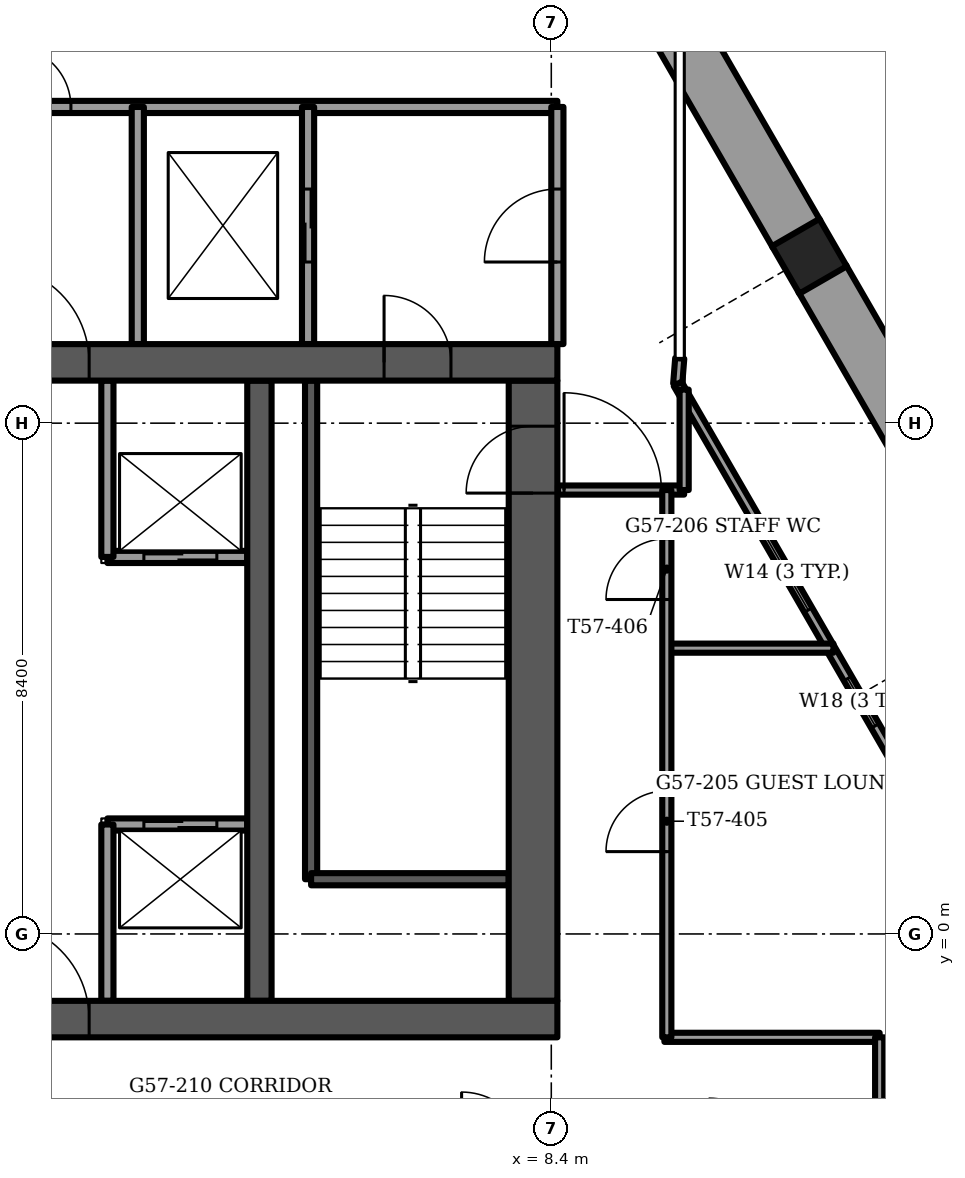
"""IFC4 building model, lengths in metres.
Left out: names, types, materials, properties, quantities, classifications, styles, units other than length and angle.
Written with IfcOpenShell. Run it as: python <this file> out.ifc"""

import sys

from ifc_helpers import new_model, si_unit, direction, frame, frame_2d, origin, origin_2d, place, context, subcontext, project, spatial, rectangle, extrude, element, fill, save


model = new_model("IFC4")
c1 = context("Model", 3, precision=1e-05, world=origin(), true_north=direction((0.0, 1.0)))
c2 = subcontext(c1, "Body", "Model", "MODEL_VIEW")
j1 = project(units=[si_unit("LENGTHUNIT", "METRE"), si_unit("PLANEANGLEUNIT", "RADIAN")], contexts=[c1])
p1 = place(None, origin())
s1 = spatial("IfcSite", under=j1, at=p1, CompositionType="ELEMENT")
p2 = place(p1, origin())
s2 = spatial("IfcBuilding", under=s1, at=p2, CompositionType="ELEMENT")
p3 = place(p2, frame((0.0, 0.0, 229.5)))
s3 = spatial("IfcBuildingStorey", under=s2, at=p3, CompositionType="ELEMENT", Elevation=229.5)
p4 = place(p3, frame((12.644, 11.145, -1.2), z_axis=(0.0, 0.0, 1.0), x_axis=(0.5, -0.866025403784, 0.0)))
e1 = element("IfcColumn", 1, at=p4, inside=s3, PredefinedType="COLUMN", context=c2, shape_type="SweptSolid", body=[
    extrude(rectangle(XDim=0.9, YDim=0.9, at=origin_2d()), origin(), (0.0, 0.0, 1.0), 3.75),
])
p5 = place(p3, frame((-8.5, -1.4, -0.3), z_axis=(0.0, 0.0, 1.0), x_axis=(1.0, 0.0, 0.0)))
e2 = element("IfcWall", 2, at=p5, inside=s3, PredefinedType="SHEAR", context=c2, shape_type="SweptSolid", body=[
    extrude(rectangle(XDim=17.0, YDim=0.6, at=frame_2d((8.5, 0.0))), origin(), (0.0, 0.0, 1.0), 3.75),
])
p6 = place(p5, frame((7.7, 0.0, 0.0)))
e3 = element("IfcOpeningElement", 3, at=p6, cuts=e2, PredefinedType="OPENING", context=c2, shape_type="SweptSolid", body=[
    extrude(rectangle(XDim=1.6, YDim=2.1, at=frame_2d((0.8, 1.05))), frame((0.0, 0.3, 0.0), z_axis=(0.0, -1.0, 0.0), x_axis=(1.0, 0.0, 0.0)), (0.0, 0.0, 1.0), 0.6),
])
p7 = place(p3, frame((-8.5, 9.4, -0.3), z_axis=(0.0, 0.0, 1.0), x_axis=(1.0, 0.0, 0.0)))
e4 = element("IfcWall", 4, at=p7, inside=s3, PredefinedType="SHEAR", context=c2, shape_type="SweptSolid", body=[
    extrude(rectangle(XDim=17.0, YDim=0.6, at=frame_2d((8.5, 0.0))), origin(), (0.0, 0.0, 1.0), 3.75),
])
p8 = place(p7, frame((7.7, 0.0, 0.0)))
e5 = element("IfcOpeningElement", 5, at=p8, cuts=e4, PredefinedType="OPENING", context=c2, shape_type="SweptSolid", body=[
    extrude(rectangle(XDim=1.6, YDim=2.1, at=frame_2d((0.8, 1.05))), frame((0.0, 0.3, 0.0), z_axis=(0.0, -1.0, 0.0), x_axis=(1.0, 0.0, 0.0)), (0.0, 0.0, 1.0), 0.6),
])
p9 = place(p7, frame((1.75, 0.0, 0.0)))
e6 = element("IfcOpeningElement", 6, at=p9, cuts=e4, PredefinedType="OPENING", context=c2, shape_type="SweptSolid", body=[
    extrude(rectangle(XDim=1.1, YDim=2.1, at=frame_2d((0.55, 1.05))), frame((0.0, 0.3, 0.0), z_axis=(0.0, -1.0, 0.0), x_axis=(1.0, 0.0, 0.0)), (0.0, 0.0, 1.0), 0.6),
])
p10 = place(p7, frame((14.15, 0.0, 0.0)))
e7 = element("IfcOpeningElement", 7, at=p10, cuts=e4, PredefinedType="OPENING", context=c2, shape_type="SweptSolid", body=[
    extrude(rectangle(XDim=1.1, YDim=2.1, at=frame_2d((0.55, 1.05))), frame((0.0, 0.3, 0.0), z_axis=(0.0, -1.0, 0.0), x_axis=(1.0, 0.0, 0.0)), (0.0, 0.0, 1.0), 0.6),
])
p11 = place(p3, frame((8.1, -1.1, -0.3), z_axis=(0.0, 0.0, 1.0), x_axis=(0.0, 1.0, 0.0)))
e8 = element("IfcWall", 8, at=p11, inside=s3, PredefinedType="SHEAR", context=c2, shape_type="SweptSolid", body=[
    extrude(rectangle(XDim=10.2, YDim=0.8, at=frame_2d((5.1, 0.0))), origin(), (0.0, 0.0, 1.0), 3.75),
])
p12 = place(p11, frame((8.35, 0.0, 0.0)))
e9 = element("IfcOpeningElement", 9, at=p12, cuts=e8, PredefinedType="OPENING", context=c2, shape_type="SweptSolid", body=[
    extrude(rectangle(XDim=1.1, YDim=2.1, at=frame_2d((0.55, 1.05))), frame((0.0, 0.4, 0.0), z_axis=(0.0, -1.0, 0.0), x_axis=(1.0, 0.0, 0.0)), (0.0, 0.0, 1.0), 0.8),
])
p13 = place(p3, frame((3.6, -1.1, -0.3), z_axis=(0.0, 0.0, 1.0), x_axis=(0.0, 1.0, 0.0)))
e10 = element("IfcWall", 10, at=p13, inside=s3, PredefinedType="SHEAR", context=c2, shape_type="SweptSolid", body=[
    extrude(rectangle(XDim=10.2, YDim=0.4, at=frame_2d((5.1, 0.0))), origin(), (0.0, 0.0, 1.0), 3.75),
])
p14 = place(p3, frame((15.764, 5.742, 0.0), z_axis=(0.0, 0.0, 1.0), x_axis=(-0.499997265274, 0.866026982673, 0.0)))
e11 = element("IfcWall", 11, at=p14, inside=s3, PredefinedType="PARAPET", context=c2, shape_type="SweptSolid", body=[
    extrude(rectangle(XDim=5.819, YDim=0.9, at=frame_2d((2.909, 0.0))), origin(), (0.0, 0.0, 1.0), 1.1),
])
p15 = place(p3, frame((12.434, 11.508, 0.0), z_axis=(0.0, 0.0, 1.0), x_axis=(-0.499994028088, 0.866028851642, 0.0)))
e12 = element("IfcWall", 12, at=p15, inside=s3, PredefinedType="PARAPET", context=c2, shape_type="SweptSolid", body=[
    extrude(rectangle(XDim=5.681, YDim=0.9, at=frame_2d((2.84, 0.0))), origin(), (0.0, 0.0, 1.0), 1.1),
])
p16 = place(p3, frame((10.479, -9.7, 0.0), z_axis=(0.0, 0.0, 1.0), x_axis=(0.499995050918, 0.866028261119, 0.0)))
e13 = element("IfcWall", 13, at=p16, inside=s3, PredefinedType="SOLIDWALL", context=c2, shape_type="SweptSolid", body=[
    extrude(rectangle(XDim=10.208, YDim=0.15, at=frame_2d((5.104, 0.0))), origin(), (0.0, 0.0, 1.0), 3.45),
])
p17 = place(p16, frame((3.461, 0.0, 0.15)))
e14 = element("IfcOpeningElement", 14, at=p17, cuts=e13, PredefinedType="OPENING", context=c2, shape_type="SweptSolid", body=[
    extrude(rectangle(XDim=0.9, YDim=2.2, at=frame_2d((0.45, 1.1))), frame((0.0, 0.075, 0.0), z_axis=(0.0, -1.0, 0.0), x_axis=(1.0, 0.0, 0.0)), (0.0, 0.0, 1.0), 0.15),
])
p18 = place(p16, frame((4.814, 0.0, 0.15)))
e15 = element("IfcOpeningElement", 15, at=p18, cuts=e13, PredefinedType="OPENING", context=c2, shape_type="SweptSolid", body=[
    extrude(rectangle(XDim=1.4, YDim=2.2, at=frame_2d((0.7, 1.1))), frame((0.0, 0.075, 0.0), z_axis=(0.0, -1.0, 0.0), x_axis=(1.0, 0.0, 0.0)), (0.0, 0.0, 1.0), 0.15),
])
p19 = place(p3, frame((15.583, 0.205, 0.0), z_axis=(0.0, 0.0, 1.0), x_axis=(-0.49998469459, 0.866034240187, 0.0)))
e16 = element("IfcWall", 16, at=p19, inside=s3, PredefinedType="SOLIDWALL", context=c2, shape_type="SweptSolid", body=[
    extrude(rectangle(XDim=10.208, YDim=0.15, at=frame_2d((5.104, 0.0))), origin(), (0.0, 0.0, 1.0), 3.45),
])
p20 = place(p19, frame((3.714, 0.0, 0.15)))
e17 = element("IfcOpeningElement", 17, at=p20, cuts=e16, PredefinedType="OPENING", context=c2, shape_type="SweptSolid", body=[
    extrude(rectangle(XDim=0.9, YDim=2.2, at=frame_2d((0.45, 1.1))), frame((0.0, 0.075, 0.0), z_axis=(0.0, -1.0, 0.0), x_axis=(1.0, 0.0, 0.0)), (0.0, 0.0, 1.0), 0.15),
])
p21 = place(p19, frame((5.914, 0.0, 0.15)))
e18 = element("IfcOpeningElement", 18, at=p21, cuts=e16, PredefinedType="OPENING", context=c2, shape_type="SweptSolid", body=[
    extrude(rectangle(XDim=1.4, YDim=2.2, at=frame_2d((0.7, 1.1))), frame((0.0, 0.075, 0.0), z_axis=(0.0, -1.0, 0.0), x_axis=(1.0, 0.0, 0.0)), (0.0, 0.0, 1.0), 0.15),
])
p22 = place(p3, frame((10.479, 9.045, 0.0), z_axis=(0.0, 0.0, 1.0), x_axis=(0.078869316502, 0.996884963732, 0.0)))
e19 = element("IfcWall", 19, at=p22, inside=s3, PredefinedType="SOLIDWALL", context=c2, shape_type="SweptSolid", body=[
    extrude(rectangle(XDim=0.421, YDim=0.15, at=frame_2d((0.21, 0.0))), origin(), (0.0, 0.0, 1.0), 3.45),
])
p23 = place(p3, frame((1.1, 1.8, 0.0), z_axis=(0.0, 0.0, 1.0), x_axis=(1.0, 0.0, 0.0)))
e20 = element("IfcWall", 20, at=p23, inside=s3, PredefinedType="PARTITIONING", context=c2, shape_type="SweptSolid", body=[
    extrude(rectangle(XDim=2.3, YDim=0.2, at=frame_2d((1.15, 0.0))), origin(), (0.0, 0.0, 1.0), 3.45),
])
p24 = place(p23, frame((0.6, 0.0, 0.0)))
e21 = element("IfcOpeningElement", 21, at=p24, cuts=e20, PredefinedType="OPENING", context=c2, shape_type="SweptSolid", body=[
    extrude(rectangle(XDim=1.2, YDim=2.1, at=frame_2d((0.6, 1.05))), frame((0.0, 0.1, 0.0), z_axis=(0.0, -1.0, 0.0), x_axis=(1.0, 0.0, 0.0)), (0.0, 0.0, 1.0), 0.2),
])
p25 = place(p3, frame((1.1, 6.2, 0.0), z_axis=(0.0, 0.0, 1.0), x_axis=(1.0, 0.0, 0.0)))
e22 = element("IfcWall", 22, at=p25, inside=s3, PredefinedType="PARTITIONING", context=c2, shape_type="SweptSolid", body=[
    extrude(rectangle(XDim=2.3, YDim=0.2, at=frame_2d((1.15, 0.0))), origin(), (0.0, 0.0, 1.0), 3.45),
])
p26 = place(p25, frame((0.6, 0.0, 0.0)))
e23 = element("IfcOpeningElement", 23, at=p26, cuts=e22, PredefinedType="OPENING", context=c2, shape_type="SweptSolid", body=[
    extrude(rectangle(XDim=1.2, YDim=2.1, at=frame_2d((0.6, 1.05))), frame((0.0, 0.1, 0.0), z_axis=(0.0, -1.0, 0.0), x_axis=(1.0, 0.0, 0.0)), (0.0, 0.0, 1.0), 0.2),
])
for number, where, z_axis, x_axis in (
    (24, (1.1, -1.1, 0.0), (0.0, 0.0, 1.0), (0.0, 1.0, 0.0)),
    (25, (1.1, 6.2, 0.0), (0.0, 0.0, 1.0), (0.0, 1.0, 0.0)),
):
    element("IfcWall", number, at=place(p3, frame(where, z_axis=z_axis, x_axis=x_axis)), inside=s3, PredefinedType="PARTITIONING", context=c2, shape_type="SweptSolid", body=[
        extrude(rectangle(XDim=2.9, YDim=0.2, at=frame_2d((1.45, 0.0))), origin(), (0.0, 0.0, 1.0), 3.45),
    ])
p27 = place(p3, frame((4.45, 0.9, -0.3), z_axis=(0.0, 0.0, 1.0), x_axis=(0.0, 1.0, 0.0)))
e26 = element("IfcWall", 26, at=p27, inside=s3, PredefinedType="SOLIDWALL", context=c2, shape_type="SweptSolid", body=[
    extrude(rectangle(XDim=8.2, YDim=0.2, at=frame_2d((4.1, 0.0))), origin(), (0.0, 0.0, 1.0), 3.75),
])
p28 = place(p3, frame((4.45, 0.9, -0.3), z_axis=(0.0, 0.0, 1.0), x_axis=(1.0, 0.0, 0.0)))
e27 = element("IfcWall", 27, at=p28, inside=s3, PredefinedType="SOLIDWALL", context=c2, shape_type="SweptSolid", body=[
    extrude(rectangle(XDim=3.25, YDim=0.2, at=frame_2d((1.625, 0.0))), origin(), (0.0, 0.0, 1.0), 3.75),
])
p29 = place(p3, frame((-8.5, 13.6, 0.0), z_axis=(0.0, 0.0, 1.0), x_axis=(1.0, 0.0, 0.0)))
e28 = element("IfcWall", 28, at=p29, inside=s3, PredefinedType="PARTITIONING", context=c2, shape_type="SweptSolid", body=[
    extrude(rectangle(XDim=17.0, YDim=0.2, at=frame_2d((8.5, 0.0))), origin(), (0.0, 0.0, 1.0), 3.45),
])
p30 = place(p29, frame((8.0, 0.0, 0.0)))
e29 = element("IfcOpeningElement", 29, at=p30, cuts=e28, PredefinedType="OPENING", context=c2, shape_type="SweptSolid", body=[
    extrude(rectangle(XDim=1.0, YDim=2.1, at=frame_2d((0.5, 1.05))), frame((0.0, 0.1, 0.0), z_axis=(0.0, -1.0, 0.0), x_axis=(1.0, 0.0, 0.0)), (0.0, 0.0, 1.0), 0.2),
])
p31 = place(p3, frame((8.5, 9.7, 0.0), z_axis=(0.0, 0.0, 1.0), x_axis=(0.0, 1.0, 0.0)))
e30 = element("IfcWall", 30, at=p31, inside=s3, PredefinedType="PARTITIONING", context=c2, shape_type="SweptSolid", body=[
    extrude(rectangle(XDim=3.9, YDim=0.2, at=frame_2d((1.95, 0.0))), origin(), (0.0, 0.0, 1.0), 3.45),
])
p32 = place(p31, frame((1.35, 0.0, 0.0)))
e31 = element("IfcOpeningElement", 31, at=p32, cuts=e30, PredefinedType="OPENING", context=c2, shape_type="SweptSolid", body=[
    extrude(rectangle(XDim=1.2, YDim=2.1, at=frame_2d((0.6, 1.05))), frame((0.0, 0.1, 0.0), z_axis=(0.0, -1.0, 0.0), x_axis=(1.0, 0.0, 0.0)), (0.0, 0.0, 1.0), 0.2),
])
p33 = place(p3, frame((4.4, 9.7, 0.0), z_axis=(0.0, 0.0, 1.0), x_axis=(0.0, 1.0, 0.0)))
e32 = element("IfcWall", 32, at=p33, inside=s3, PredefinedType="PARTITIONING", context=c2, shape_type="SweptSolid", body=[
    extrude(rectangle(XDim=3.9, YDim=0.2, at=frame_2d((1.95, 0.0))), origin(), (0.0, 0.0, 1.0), 3.45),
])
p34 = place(p33, frame((1.35, 0.0, 0.0)))
e33 = element("IfcOpeningElement", 33, at=p34, cuts=e32, PredefinedType="OPENING", context=c2, shape_type="SweptSolid", body=[
    extrude(rectangle(XDim=1.2, YDim=2.1, at=frame_2d((0.6, 1.05))), frame((0.0, 0.1, 0.0), z_axis=(0.0, -1.0, 0.0), x_axis=(1.0, 0.0, 0.0)), (0.0, 0.0, 1.0), 0.2),
])
p35 = place(p3, frame((1.6, 9.7, 0.0), z_axis=(0.0, 0.0, 1.0), x_axis=(0.0, 1.0, 0.0)))
e34 = element("IfcWall", 34, at=p35, inside=s3, PredefinedType="PARTITIONING", context=c2, shape_type="SweptSolid", body=[
    extrude(rectangle(XDim=3.9, YDim=0.2, at=frame_2d((1.95, 0.0))), origin(), (0.0, 0.0, 1.0), 3.45),
])
p36 = place(p3, frame((10.26, -1.7, 0.0), z_axis=(0.0, 0.0, 1.0), x_axis=(1.0, 0.0, 0.0)))
e35 = element("IfcWall", 35, at=p36, inside=s3, PredefinedType="PARTITIONING", context=c2, shape_type="SweptSolid", body=[
    extrude(rectangle(XDim=3.54, YDim=0.15, at=frame_2d((1.77, 0.0))), origin(), (0.0, 0.0, 1.0), 3.45),
])
p37 = place(p3, frame((10.3, 4.7, 0.0), z_axis=(0.0, 0.0, 1.0), x_axis=(1.0, 0.0, 0.0)))
e36 = element("IfcWall", 36, at=p37, inside=s3, PredefinedType="PARTITIONING", context=c2, shape_type="SweptSolid", body=[
    extrude(rectangle(XDim=2.74, YDim=0.15, at=frame_2d((1.37, 0.0))), origin(), (0.0, 0.0, 1.0), 3.45),
])
p38 = place(p3, frame((8.51, 7.3, 0.0), z_axis=(0.0, 0.0, 1.0), x_axis=(1.0, 0.0, 0.0)))
e37 = element("IfcWall", 37, at=p38, inside=s3, PredefinedType="PARTITIONING", context=c2, shape_type="SweptSolid", body=[
    extrude(rectangle(XDim=2.075, YDim=0.15, at=frame_2d((1.038, 0.0))), origin(), (0.0, 0.0, 1.0), 3.45),
])
p39 = place(p38, frame((0.1, 0.0, 0.0)))
e38 = element("IfcOpeningElement", 38, at=p39, cuts=e37, PredefinedType="OPENING", context=c2, shape_type="SweptSolid", body=[
    extrude(rectangle(XDim=1.6, YDim=2.1, at=frame_2d((0.8, 1.05))), frame((0.0, 0.075, 0.0), z_axis=(0.0, -1.0, 0.0), x_axis=(1.0, 0.0, 0.0)), (0.0, 0.0, 1.0), 0.15),
])
p40 = place(p3, frame((13.8, -4.038, 0.0), z_axis=(0.0, 0.0, 1.0), x_axis=(0.0, 1.0, 0.0)))
e39 = element("IfcWall", 39, at=p40, inside=s3, PredefinedType="PARTITIONING", context=c2, shape_type="SweptSolid", body=[
    extrude(rectangle(XDim=2.338, YDim=0.15, at=frame_2d((1.169, 0.0))), origin(), (0.0, 0.0, 1.0), 3.45),
])
p41 = place(p3, frame((10.585, 7.3, 0.0), z_axis=(0.0, 0.0, 1.0), x_axis=(0.0, 1.0, 0.0)))
e40 = element("IfcWall", 40, at=p41, inside=s3, PredefinedType="PARTITIONING", context=c2, shape_type="SweptSolid", body=[
    extrude(rectangle(XDim=1.652, YDim=0.15, at=frame_2d((0.826, 0.0))), origin(), (0.0, 0.0, 1.0), 3.45),
])
p42 = place(p3, frame((10.3, -1.7, 0.0), z_axis=(0.0, 0.0, 1.0), x_axis=(0.0, 1.0, 0.0)))
e41 = element("IfcWall", 41, at=p42, inside=s3, PredefinedType="PARTITIONING", context=c2, shape_type="SweptSolid", body=[
    extrude(rectangle(XDim=9.0, YDim=0.15, at=frame_2d((4.5, 0.0))), origin(), (0.0, 0.0, 1.0), 3.45),
])
p43 = place(p42, frame((3.054, 0.0, 0.0)))
e42 = element("IfcOpeningElement", 42, at=p43, cuts=e41, PredefinedType="OPENING", context=c2, shape_type="SweptSolid", body=[
    extrude(rectangle(XDim=1.0, YDim=2.1, at=frame_2d((0.5, 1.05))), frame((0.0, 0.075, 0.0), z_axis=(0.0, -1.0, 0.0), x_axis=(1.0, 0.0, 0.0)), (0.0, 0.0, 1.0), 0.15),
])
p44 = place(p42, frame((7.2, 0.0, 0.0)))
e43 = element("IfcOpeningElement", 43, at=p44, cuts=e41, PredefinedType="OPENING", context=c2, shape_type="SweptSolid", body=[
    extrude(rectangle(XDim=1.0, YDim=2.1, at=frame_2d((0.5, 1.05))), frame((0.0, 0.075, 0.0), z_axis=(0.0, -1.0, 0.0), x_axis=(1.0, 0.0, 0.0)), (0.0, 0.0, 1.0), 0.15),
])
p45 = place(p20, origin())
e44 = element("IfcWindow", 44, at=p45, inside=s3, PartitioningType="SINGLE_PANEL", PredefinedType="WINDOW", context=c2, shape_type="SweptSolid", body=[
    extrude(rectangle(XDim=0.9, YDim=2.2, at=frame_2d((0.45, 1.1))), frame((0.0, 0.03, 0.0), z_axis=(0.0, -1.0, 0.0), x_axis=(1.0, 0.0, 0.0)), (0.0, 0.0, 1.0), 0.06),
])
fill(e17, e44)
p46 = place(p21, origin())
e45 = element("IfcWindow", 45, at=p46, inside=s3, PartitioningType="SINGLE_PANEL", PredefinedType="WINDOW", context=c2, shape_type="SweptSolid", body=[
    extrude(rectangle(XDim=1.4, YDim=2.2, at=frame_2d((0.7, 1.1))), frame((0.0, 0.03, 0.0), z_axis=(0.0, -1.0, 0.0), x_axis=(1.0, 0.0, 0.0)), (0.0, 0.0, 1.0), 0.06),
])
fill(e18, e45)
p47 = place(p24, origin())
e46 = element("IfcDoor", 46, at=p47, inside=s3, OperationType="SLIDING_TO_LEFT", PredefinedType="DOOR", context=c2, shape_type="SweptSolid", body=[
    extrude(rectangle(XDim=1.2, YDim=2.1, at=frame_2d((0.6, 1.05))), frame((0.0, 0.025, 0.0), z_axis=(0.0, -1.0, 0.0), x_axis=(1.0, 0.0, 0.0)), (0.0, 0.0, 1.0), 0.05),
])
fill(e21, e46)
p48 = place(p26, origin())
e47 = element("IfcDoor", 47, at=p48, inside=s3, OperationType="SLIDING_TO_LEFT", PredefinedType="DOOR", context=c2, shape_type="SweptSolid", body=[
    extrude(rectangle(XDim=1.2, YDim=2.1, at=frame_2d((0.6, 1.05))), frame((0.0, 0.025, 0.0), z_axis=(0.0, -1.0, 0.0), x_axis=(1.0, 0.0, 0.0)), (0.0, 0.0, 1.0), 0.05),
])
fill(e23, e47)
p49 = place(p6, origin())
e48 = element("IfcDoor", 48, at=p49, inside=s3, OperationType="DOUBLE_DOOR_SINGLE_SWING", PredefinedType="DOOR", context=c2, shape_type="SweptSolid", body=[
    extrude(rectangle(XDim=1.6, YDim=2.1, at=frame_2d((0.8, 1.05))), frame((0.0, 0.025, 0.0), z_axis=(0.0, -1.0, 0.0), x_axis=(1.0, 0.0, 0.0)), (0.0, 0.0, 1.0), 0.05),
])
fill(e3, e48)
p50 = place(p8, origin())
e49 = element("IfcDoor", 49, at=p50, inside=s3, OperationType="DOUBLE_DOOR_SINGLE_SWING", PredefinedType="DOOR", context=c2, shape_type="SweptSolid", body=[
    extrude(rectangle(XDim=1.6, YDim=2.1, at=frame_2d((0.8, 1.05))), frame((0.0, 0.025, 0.0), z_axis=(0.0, -1.0, 0.0), x_axis=(1.0, 0.0, 0.0)), (0.0, 0.0, 1.0), 0.05),
])
fill(e5, e49)
p51 = place(p10, origin())
e50 = element("IfcDoor", 50, at=p51, inside=s3, OperationType="SINGLE_SWING_RIGHT", PredefinedType="DOOR", context=c2, shape_type="SweptSolid", body=[
    extrude(rectangle(XDim=1.1, YDim=2.1, at=frame_2d((0.55, 1.05))), frame((0.0, 0.025, 0.0), z_axis=(0.0, -1.0, 0.0), x_axis=(1.0, 0.0, 0.0)), (0.0, 0.0, 1.0), 0.05),
])
fill(e7, e50)
p52 = place(p12, origin())
e51 = element("IfcDoor", 51, at=p52, inside=s3, OperationType="SINGLE_SWING_LEFT", PredefinedType="DOOR", context=c2, shape_type="SweptSolid", body=[
    extrude(rectangle(XDim=1.1, YDim=2.1, at=frame_2d((0.55, 1.05))), frame((0.0, 0.025, 0.0), z_axis=(0.0, -1.0, 0.0), x_axis=(1.0, 0.0, 0.0)), (0.0, 0.0, 1.0), 0.05),
])
fill(e9, e51)
p53 = place(p34, origin())
e52 = element("IfcDoor", 52, at=p53, inside=s3, OperationType="SLIDING_TO_LEFT", PredefinedType="DOOR", context=c2, shape_type="SweptSolid", body=[
    extrude(rectangle(XDim=1.2, YDim=2.1, at=frame_2d((0.6, 1.05))), frame((0.0, 0.025, 0.0), z_axis=(0.0, -1.0, 0.0), x_axis=(1.0, 0.0, 0.0)), (0.0, 0.0, 1.0), 0.05),
])
fill(e33, e52)
p54 = place(p32, origin())
e53 = element("IfcDoor", 53, at=p54, inside=s3, OperationType="SINGLE_SWING_LEFT", PredefinedType="DOOR", context=c2, shape_type="SweptSolid", body=[
    extrude(rectangle(XDim=1.2, YDim=2.1, at=frame_2d((0.6, 1.05))), frame((0.0, 0.025, 0.0), z_axis=(0.0, -1.0, 0.0), x_axis=(1.0, 0.0, 0.0)), (0.0, 0.0, 1.0), 0.05),
])
fill(e31, e53)
p55 = place(p30, origin())
e54 = element("IfcDoor", 54, at=p55, inside=s3, OperationType="SINGLE_SWING_LEFT", PredefinedType="DOOR", context=c2, shape_type="SweptSolid", body=[
    extrude(rectangle(XDim=1.0, YDim=2.1, at=frame_2d((0.5, 1.05))), frame((0.0, 0.025, 0.0), z_axis=(0.0, -1.0, 0.0), x_axis=(1.0, 0.0, 0.0)), (0.0, 0.0, 1.0), 0.05),
])
fill(e29, e54)
p56 = place(p43, origin())
e55 = element("IfcDoor", 55, at=p56, inside=s3, OperationType="SINGLE_SWING_RIGHT", PredefinedType="DOOR", context=c2, shape_type="SweptSolid", body=[
    extrude(rectangle(XDim=1.0, YDim=2.1, at=frame_2d((0.5, 1.05))), frame((0.0, 0.025, 0.0), z_axis=(0.0, -1.0, 0.0), x_axis=(1.0, 0.0, 0.0)), (0.0, 0.0, 1.0), 0.05),
])
fill(e42, e55)
p57 = place(p44, origin())
e56 = element("IfcDoor", 56, at=p57, inside=s3, OperationType="SINGLE_SWING_LEFT", PredefinedType="DOOR", context=c2, shape_type="SweptSolid", body=[
    extrude(rectangle(XDim=1.0, YDim=2.1, at=frame_2d((0.5, 1.05))), frame((0.0, 0.025, 0.0), z_axis=(0.0, -1.0, 0.0), x_axis=(1.0, 0.0, 0.0)), (0.0, 0.0, 1.0), 0.05),
])
fill(e43, e56)
p58 = place(p39, origin())
e57 = element("IfcDoor", 57, at=p58, inside=s3, OperationType="DOUBLE_DOOR_SINGLE_SWING", PredefinedType="DOOR", context=c2, shape_type="SweptSolid", body=[
    extrude(rectangle(XDim=1.6, YDim=2.1, at=frame_2d((0.8, 1.05))), frame((0.0, 0.025, 0.0), z_axis=(0.0, -1.0, 0.0), x_axis=(1.0, 0.0, 0.0)), (0.0, 0.0, 1.0), 0.05),
])
fill(e38, e57)
save(model, sys.argv[1])
